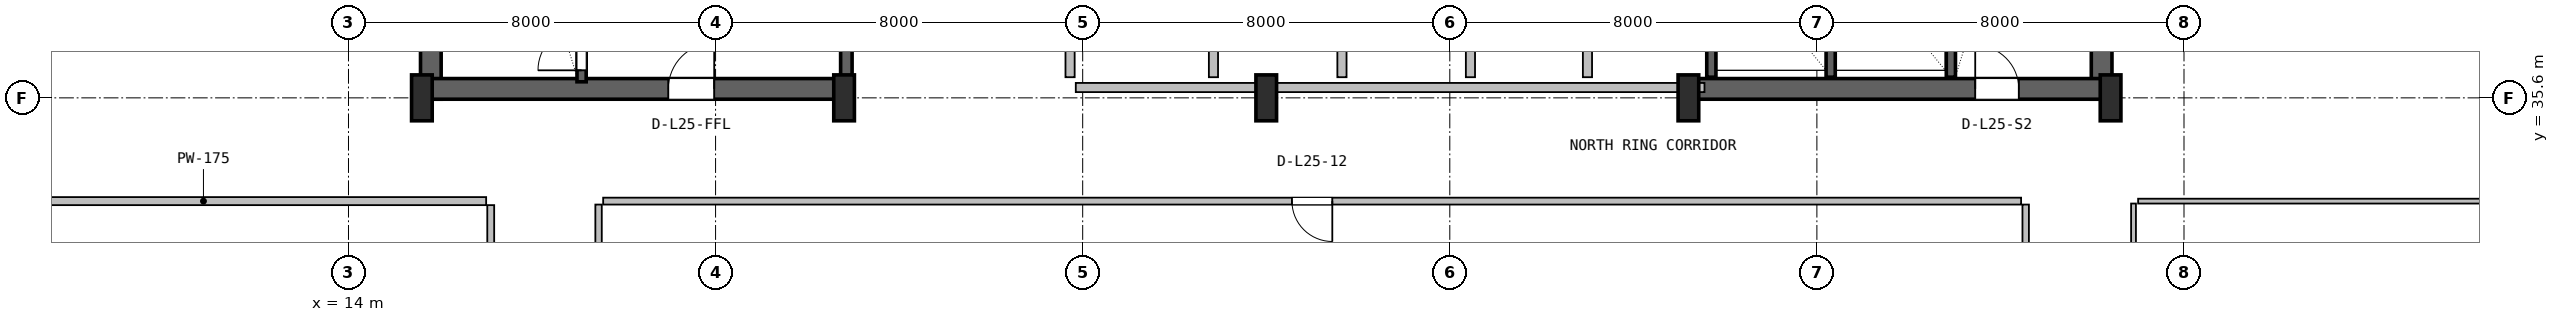
"""IFC4 building model, lengths in metres.
Left out: names, types, materials, properties, quantities, classifications, styles, units other than length and angle.
Written with IfcOpenShell. Run it as: python <this file> out.ifc"""

import sys

from ifc_helpers import new_model, si_unit, direction, frame, frame_2d, origin, origin_2d, place, context, subcontext, project, spatial, rectangle, i_section, extrude, source, transform, mapped, element, fill, save


model = new_model("IFC4")
c1 = context("Model", 3, precision=1e-05, world=origin(), true_north=direction((0.0, 1.0)))
c2 = subcontext(c1, "Body", "Model", "MODEL_VIEW")
j1 = project(units=[si_unit("LENGTHUNIT", "METRE"), si_unit("PLANEANGLEUNIT", "RADIAN")], contexts=[c1])
p1 = place(None, origin())
s1 = spatial("IfcSite", under=j1, at=p1, CompositionType="ELEMENT")
p2 = place(p1, origin())
s2 = spatial("IfcBuilding", under=s1, at=p2, CompositionType="ELEMENT")
p3 = place(p2, frame((0.0, 0.0, 106.8)))
s3 = spatial("IfcBuildingStorey", under=s2, at=p3, CompositionType="ELEMENT", Elevation=106.8)
for number, where, z_axis, x_axis in (
    (1, (15.795, 35.57, 0.0), (0.0, 0.0, 1.0), (0.0, 1.0, 0.0)),
    (2, (52.205, 35.57, 0.0), (0.0, 0.0, 1.0), (0.0, 1.0, 0.0)),
):
    element("IfcWall", number, at=place(p3, frame(where, z_axis=z_axis, x_axis=x_axis)), inside=s3, PredefinedType="SHEAR", context=c2, shape_type="SweptSolid", body=[
        extrude(rectangle(XDim=11.23, YDim=0.45, at=frame_2d((5.615, 0.0))), origin(), (0.0, 0.0, 1.0), 3.55),
    ])
p4 = place(p3, frame((15.57, 35.795, 0.0), z_axis=(0.0, 0.0, 1.0), x_axis=(1.0, 0.0, 0.0)))
e3 = element("IfcWall", 3, at=p4, inside=s3, PredefinedType="SHEAR", context=c2, shape_type="SweptSolid", body=[
    extrude(rectangle(XDim=9.23, YDim=0.45, at=frame_2d((4.615, 0.0))), origin(), (0.0, 0.0, 1.0), 3.55),
])
p5 = place(p4, frame((5.4, 0.0, 0.0)))
e4 = element("IfcOpeningElement", 4, at=p5, cuts=e3, PredefinedType="OPENING", context=c2, shape_type="SweptSolid", body=[
    extrude(rectangle(XDim=1.0, YDim=2.1, at=frame_2d((0.5, 1.05))), frame((0.0, 0.235, 0.0), z_axis=(0.0, -1.0, 0.0), x_axis=(1.0, 0.0, 0.0)), (0.0, 0.0, 1.0), 0.47),
])
p6 = place(p3, frame((43.2, 35.795, 0.0), z_axis=(0.0, 0.0, 1.0), x_axis=(1.0, 0.0, 0.0)))
e5 = element("IfcWall", 5, at=p6, inside=s3, PredefinedType="SHEAR", context=c2, shape_type="SweptSolid", body=[
    extrude(rectangle(XDim=9.23, YDim=0.45, at=frame_2d((4.615, 0.0))), origin(), (0.0, 0.0, 1.0), 3.55),
])
p7 = place(p6, frame((6.25, 0.0, 0.0)))
e6 = element("IfcOpeningElement", 6, at=p7, cuts=e5, PredefinedType="OPENING", context=c2, shape_type="SweptSolid", body=[
    extrude(rectangle(XDim=0.95, YDim=2.1, at=frame_2d((0.475, 1.05))), frame((0.0, 0.235, 0.0), z_axis=(0.0, -1.0, 0.0), x_axis=(1.0, 0.0, 0.0)), (0.0, 0.0, 1.0), 0.47),
])
m1 = source(origin(), c2, "Body", "SweptSolid", [
    extrude(i_section(OverallWidth=0.45, OverallDepth=1.0, WebThickness=0.016, FlangeThickness=0.03, FilletRadius=0.016, at=origin_2d()), origin(), (0.0, 0.0, 1.0), 3.8),
])
for number, where, z_axis, x_axis in (
    (7, (15.6, 35.6, 0.0), (0.0, 0.0, 1.0), (1.0, 0.0, 0.0)),
    (8, (24.8, 35.6, 0.0), (0.0, 0.0, 1.0), (1.0, 0.0, 0.0)),
    (9, (34.0, 35.6, 0.0), (0.0, 0.0, 1.0), (1.0, 0.0, 0.0)),
    (10, (43.2, 35.6, 0.0), (0.0, 0.0, 1.0), (1.0, 0.0, 0.0)),
    (11, (52.4, 35.6, 0.0), (0.0, 0.0, 1.0), (1.0, 0.0, 0.0)),
):
    element("IfcColumn", number, at=place(p3, frame(where, z_axis=z_axis, x_axis=x_axis)), inside=s3, PredefinedType="COLUMN", context=c2, shape_type="MappedRepresentation", body=[
        mapped(m1, transform((0.0, 0.0, 0.0), x_axis=(1.0, 0.0, 0.0), y_axis=(0.0, 1.0, 0.0), z_axis=(0.0, 0.0, 1.0), scale=1.0)),
    ])
p8 = place(p3, frame((19.08, 35.95, 0.0), z_axis=(0.0, 0.0, 1.0), x_axis=(0.0, 1.0, 0.0)))
e12 = element("IfcWall", 12, at=p8, inside=s3, PredefinedType="SHEAR", context=c2, shape_type="SweptSolid", body=[
    extrude(rectangle(XDim=9.65, YDim=0.2, at=frame_2d((4.825, 0.0))), origin(), (0.0, 0.0, 1.0), 3.55),
])
p9 = place(p8, frame((0.25, 0.0, 0.0)))
e13 = element("IfcOpeningElement", 13, at=p9, cuts=e12, PredefinedType="OPENING", context=c2, shape_type="SweptSolid", body=[
    extrude(rectangle(XDim=0.95, YDim=2.1, at=frame_2d((0.475, 1.05))), frame((0.0, 0.11, 0.0), z_axis=(0.0, -1.0, 0.0), x_axis=(1.0, 0.0, 0.0)), (0.0, 0.0, 1.0), 0.22),
])
p10 = place(p3, frame((24.85, 36.05, 0.0), z_axis=(0.0, 0.0, 1.0), x_axis=(0.0, 1.0, 0.0)))
e14 = element("IfcWall", 14, at=p10, inside=s3, PredefinedType="SHEAR", context=c2, shape_type="SweptSolid", body=[
    extrude(rectangle(XDim=10.45, YDim=0.25, at=frame_2d((5.225, 0.0))), origin(), (0.0, 0.0, 1.0), 3.55),
])
p11 = place(p3, frame((48.92, 36.05, 0.0), z_axis=(0.0, 0.0, 1.0), x_axis=(0.0, 1.0, 0.0)))
e15 = element("IfcWall", 15, at=p11, inside=s3, PredefinedType="SHEAR", context=c2, shape_type="SweptSolid", body=[
    extrude(rectangle(XDim=10.5, YDim=0.2, at=frame_2d((5.25, 0.0))), origin(), (0.0, 0.0, 1.0), 3.55),
])
for number, where, z_axis, x_axis in (
    (16, (43.7, 36.05, 0.0), (0.0, 0.0, 1.0), (0.0, 1.0, 0.0)),
    (17, (46.3, 36.05, 0.0), (0.0, 0.0, 1.0), (0.0, 1.0, 0.0)),
):
    element("IfcWall", number, at=place(p3, frame(where, z_axis=z_axis, x_axis=x_axis)), inside=s3, PredefinedType="SHEAR", context=c2, shape_type="SweptSolid", body=[
        extrude(rectangle(XDim=3.05, YDim=0.2, at=frame_2d((1.525, 0.0))), origin(), (0.0, 0.0, 1.0), 3.55),
    ])
p12 = place(p3, frame((29.85, 35.825, 0.0), z_axis=(0.0, 0.0, 1.0), x_axis=(1.0, 0.0, 0.0)))
e18 = element("IfcWall", 18, at=p12, inside=s3, PredefinedType="SOLIDWALL", context=c2, shape_type="SweptSolid", body=[
    extrude(rectangle(XDim=13.7, YDim=0.2, at=frame_2d((6.85, 0.0))), origin(), (0.0, 0.0, 1.0), 2.325),
])
for number, where, z_axis, x_axis in (
    (19, (32.85, 36.05, 0.0), (0.0, 0.0, 1.0), (0.0, 1.0, 0.0)),
    (20, (29.725, 36.05, 0.0), (0.0, 0.0, 1.0), (0.0, 1.0, 0.0)),
    (21, (35.65, 36.05, 0.0), (0.0, 0.0, 1.0), (0.0, 1.0, 0.0)),
    (22, (38.45, 36.05, 0.0), (0.0, 0.0, 1.0), (0.0, 1.0, 0.0)),
):
    element("IfcWall", number, at=place(p3, frame(where, z_axis=z_axis, x_axis=x_axis)), inside=s3, PredefinedType="PLUMBINGWALL", context=c2, shape_type="SweptSolid", body=[
        extrude(rectangle(XDim=3.1, YDim=0.2, at=frame_2d((1.55, 0.0))), origin(), (0.0, 0.0, 1.0), 3.53),
    ])
p13 = place(p3, frame((41.0, 36.05, 0.0), z_axis=(0.0, 0.0, 1.0), x_axis=(0.0, 1.0, 0.0)))
e23 = element("IfcWall", 23, at=p13, inside=s3, PredefinedType="SOLIDWALL", context=c2, shape_type="SweptSolid", body=[
    extrude(rectangle(XDim=3.1, YDim=0.2, at=frame_2d((1.55, 0.0))), origin(), (0.0, 0.0, 1.0), 3.53),
])
p14 = place(p3, frame((17.1, 12.533, 0.0), z_axis=(0.0, 0.0, 1.0), x_axis=(0.0, 1.0, 0.0)))
e24 = element("IfcWall", 24, at=p14, inside=s3, PredefinedType="PARTITIONING", context=c2, shape_type="SweptSolid", body=[
    extrude(rectangle(XDim=20.73, YDim=0.15, at=frame_2d((10.365, 0.0))), origin(), (0.0, 0.0, 1.0), 3.222),
])
p15 = place(p14, frame((5.427, 0.0, 0.0)))
e25 = element("IfcOpeningElement", 25, at=p15, cuts=e24, PredefinedType="OPENING", context=c2, shape_type="SweptSolid", body=[
    extrude(rectangle(XDim=0.92, YDim=2.08, at=frame_2d((0.46, 1.04))), frame((0.0, 0.085, 0.0), z_axis=(0.0, -1.0, 0.0), x_axis=(1.0, 0.0, 0.0)), (0.0, 0.0, 1.0), 0.17),
])
p16 = place(p14, frame((15.797, 0.0, 0.0)))
e26 = element("IfcOpeningElement", 26, at=p16, cuts=e24, PredefinedType="OPENING", context=c2, shape_type="SweptSolid", body=[
    extrude(rectangle(XDim=1.05, YDim=2.1, at=frame_2d((0.525, 1.05))), frame((0.0, 0.085, 0.0), z_axis=(0.0, -1.0, 0.0), x_axis=(1.0, 0.0, 0.0)), (0.0, 0.0, 1.0), 0.17),
])
p17 = place(p3, frame((4.68, 33.35, 0.0), z_axis=(0.0, 0.0, 1.0), x_axis=(1.0, 0.0, 0.0)))
e27 = element("IfcWall", 27, at=p17, inside=s3, PredefinedType="PARTITIONING", context=c2, shape_type="SweptSolid", body=[
    extrude(rectangle(XDim=12.32, YDim=0.175, at=frame_2d((6.16, 0.0))), origin(), (0.0, 0.0, 1.0), 3.108),
])
for number, where, z_axis, x_axis in (
    (28, (50.55, 14.9, 0.0), (0.0, 0.0, 1.0), (0.0, 1.0, 0.0)),
    (29, (19.45, 14.9, 0.0), (0.0, 0.0, 1.0), (0.0, 1.0, 0.0)),
):
    element("IfcWall", number, at=place(p3, frame(where, z_axis=z_axis, x_axis=x_axis)), inside=s3, PredefinedType="PARTITIONING", context=c2, shape_type="SweptSolid", body=[
        extrude(rectangle(XDim=18.375, YDim=0.14, at=frame_2d((9.188, 0.0))), origin(), (0.0, 0.0, 1.0), 3.222),
    ])
p18 = place(p3, frame((19.55, 33.35, 0.0), z_axis=(0.0, 0.0, 1.0), x_axis=(1.0, 0.0, 0.0)))
e30 = element("IfcWall", 30, at=p18, inside=s3, PredefinedType="PARTITIONING", context=c2, shape_type="SweptSolid", body=[
    extrude(rectangle(XDim=30.9, YDim=0.15, at=frame_2d((15.45, 0.0))), origin(), (0.0, 0.0, 1.0), 2.83),
])
p19 = place(p18, frame((15.01, 0.0, 0.0)))
e31 = element("IfcOpeningElement", 31, at=p19, cuts=e30, PredefinedType="OPENING", context=c2, shape_type="SweptSolid", body=[
    extrude(rectangle(XDim=0.88, YDim=2.06, at=frame_2d((0.44, 1.03))), frame((0.0, 0.085, 0.0), z_axis=(0.0, -1.0, 0.0), x_axis=(1.0, 0.0, 0.0)), (0.0, 0.0, 1.0), 0.17),
])
p20 = place(p3, frame((53.0, 33.35, 0.0), z_axis=(0.0, 0.0, 1.0), x_axis=(1.0, 0.0, 0.0)))
e32 = element("IfcWall", 32, at=p20, inside=s3, PredefinedType="PARTITIONING", context=c2, shape_type="SweptSolid", body=[
    extrude(rectangle(XDim=10.32, YDim=0.105, at=frame_2d((5.16, 0.0))), origin(), (0.0, 0.0, 1.0), 3.108),
])
p21 = place(p3, frame((52.9, 12.533, 0.0), z_axis=(0.0, 0.0, 1.0), x_axis=(0.0, 1.0, 0.0)))
e33 = element("IfcWall", 33, at=p21, inside=s3, PredefinedType="PARTITIONING", context=c2, shape_type="SweptSolid", body=[
    extrude(rectangle(XDim=20.764, YDim=0.105, at=frame_2d((10.382, 0.0))), origin(), (0.0, 0.0, 1.0), 3.222),
])
p22 = place(p21, frame((9.942, 0.0, 0.0)))
e34 = element("IfcOpeningElement", 34, at=p22, cuts=e33, PredefinedType="OPENING", context=c2, shape_type="SweptSolid", body=[
    extrude(rectangle(XDim=0.88, YDim=2.06, at=frame_2d((0.44, 1.03))), frame((0.0, 0.062, 0.0), z_axis=(0.0, -1.0, 0.0), x_axis=(1.0, 0.0, 0.0)), (0.0, 0.0, 1.0), 0.125),
])
m2 = source(origin(), c2, "Body", "SweptSolid", [
    extrude(rectangle(XDim=0.95, YDim=2.1, at=frame_2d((0.475, 1.05))), frame((0.0, 0.025, 0.0), z_axis=(0.0, -1.0, 0.0), x_axis=(1.0, 0.0, 0.0)), (0.0, 0.0, 1.0), 0.05),
])
p23 = place(p9, origin())
e35 = element("IfcDoor", 35, at=p23, inside=s3, OperationType="SINGLE_SWING_LEFT", PredefinedType="DOOR", context=c2, shape_type="MappedRepresentation", body=[
    mapped(m2, transform((0.0, 0.0, 0.0), x_axis=(1.0, 0.0, 0.0), y_axis=(0.0, 1.0, 0.0), z_axis=(0.0, 0.0, 1.0), scale=1.0)),
])
fill(e13, e35)
m3 = source(origin(), c2, "Body", "SweptSolid", [
    extrude(rectangle(XDim=1.0, YDim=2.1, at=frame_2d((0.5, 1.05))), frame((0.0, 0.025, 0.0), z_axis=(0.0, -1.0, 0.0), x_axis=(1.0, 0.0, 0.0)), (0.0, 0.0, 1.0), 0.05),
])
p24 = place(p5, origin())
e36 = element("IfcDoor", 36, at=p24, inside=s3, OperationType="SINGLE_SWING_RIGHT", PredefinedType="DOOR", context=c2, shape_type="MappedRepresentation", body=[
    mapped(m3, transform((0.0, 0.0, 0.0), x_axis=(1.0, 0.0, 0.0), y_axis=(0.0, 1.0, 0.0), z_axis=(0.0, 0.0, 1.0), scale=1.0)),
])
fill(e4, e36)
p25 = place(p7, origin())
e37 = element("IfcDoor", 37, at=p25, inside=s3, OperationType="SINGLE_SWING_LEFT", PredefinedType="DOOR", context=c2, shape_type="MappedRepresentation", body=[
    mapped(m2, transform((0.0, 0.0, 0.0), x_axis=(1.0, 0.0, 0.0), y_axis=(0.0, 1.0, 0.0), z_axis=(0.0, 0.0, 1.0), scale=1.0)),
])
fill(e6, e37)
m4 = source(origin(), c2, "Body", "SweptSolid", [
    extrude(rectangle(XDim=0.88, YDim=2.06, at=frame_2d((0.44, 1.03))), frame((0.0, 0.025, 0.0), z_axis=(0.0, -1.0, 0.0), x_axis=(1.0, 0.0, 0.0)), (0.0, 0.0, 1.0), 0.05),
])
p26 = place(p19, frame((0.88, 0.0, 0.0), z_axis=(0.0, 0.0, 1.0), x_axis=(-1.0, 0.0, 0.0)))
e38 = element("IfcDoor", 38, at=p26, inside=s3, OperationType="SINGLE_SWING_RIGHT", PredefinedType="DOOR", context=c2, shape_type="MappedRepresentation", body=[
    mapped(m4, transform((0.0, 0.0, 0.0), x_axis=(1.0, 0.0, 0.0), y_axis=(0.0, 1.0, 0.0), z_axis=(0.0, 0.0, 1.0), scale=1.0)),
])
fill(e31, e38)
save(model, sys.argv[1])
